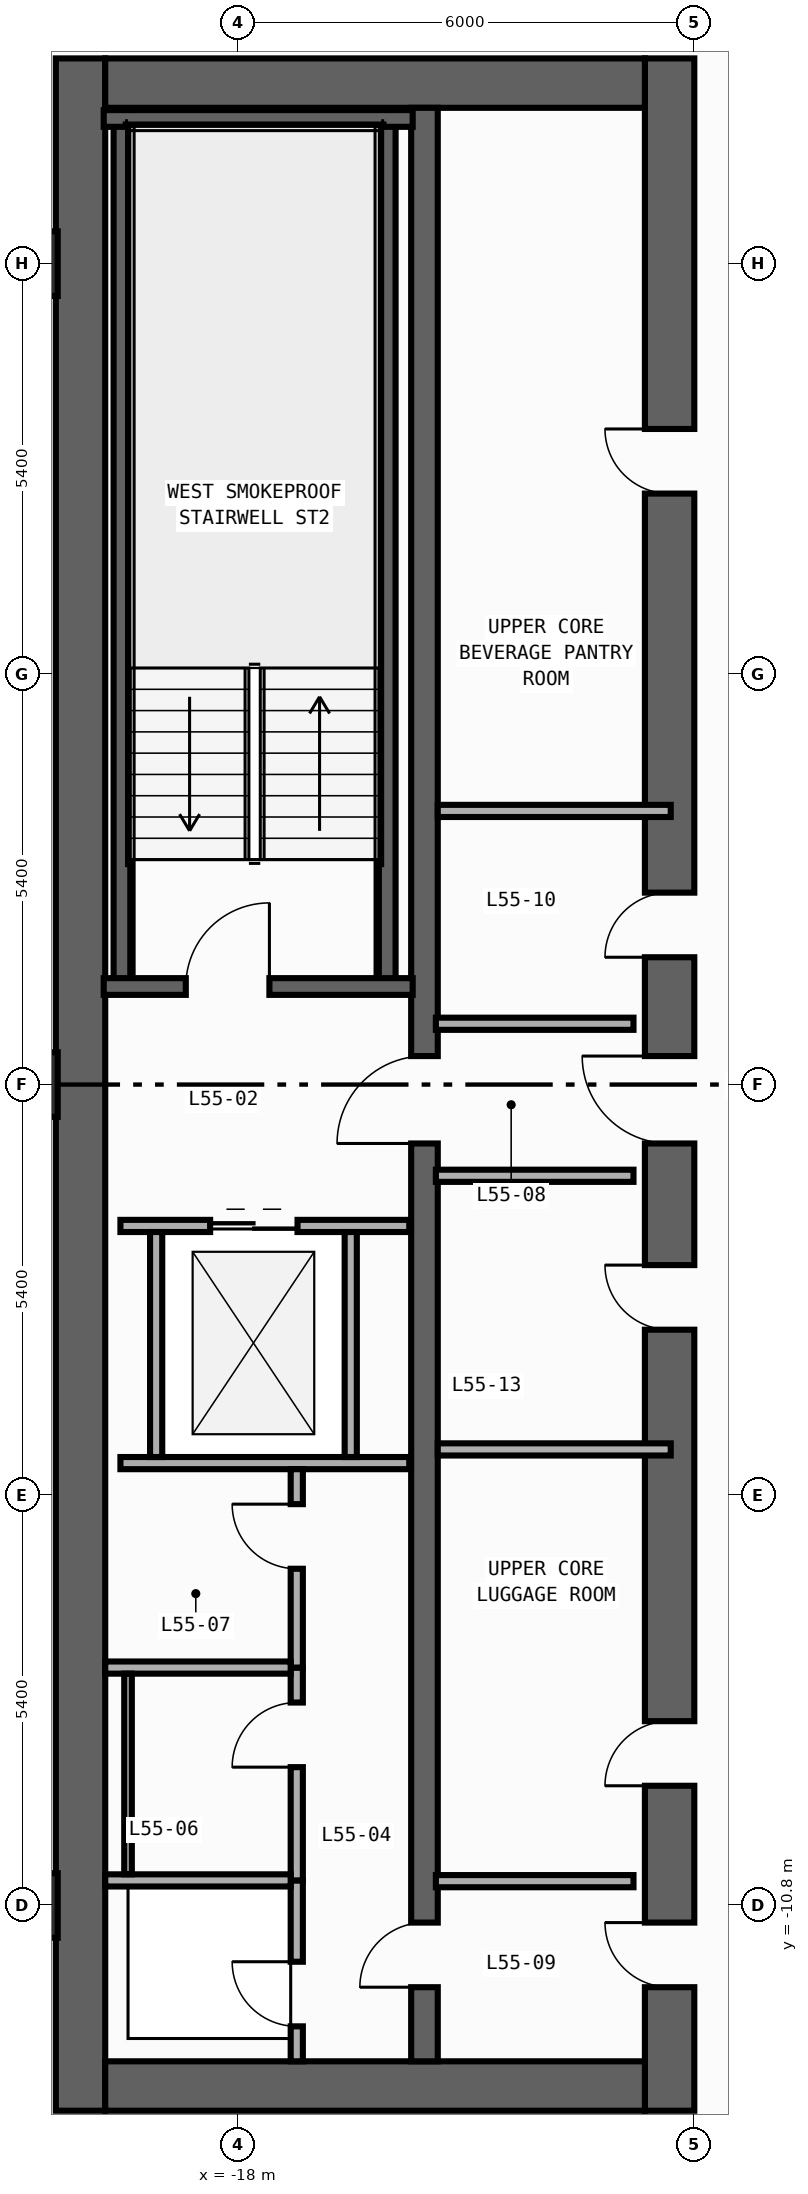
"""IFC4 building model, lengths in metres.
Left out: names, types, materials, properties, quantities, classifications, styles, units other than length and angle.
Written with IfcOpenShell. Run it as: python <this file> out.ifc"""

import sys

from ifc_helpers import new_model, si_unit, direction, frame, frame_2d, origin, origin_2d, place, context, subcontext, project, spatial, rectangle, extrude, element, fill, save


model = new_model("IFC4")
c1 = context("Model", 3, precision=1e-05, world=origin(), true_north=direction((0.0, 1.0)))
c2 = subcontext(c1, "Body", "Model", "MODEL_VIEW")
j1 = project(units=[si_unit("LENGTHUNIT", "METRE"), si_unit("PLANEANGLEUNIT", "RADIAN")], contexts=[c1])
p1 = place(None, origin())
s1 = spatial("IfcSite", under=j1, at=p1, CompositionType="ELEMENT")
p2 = place(p1, origin())
s2 = spatial("IfcBuilding", under=s1, at=p2, CompositionType="ELEMENT")
p3 = place(p2, frame((0.0, 0.0, 236.8)))
s3 = spatial("IfcBuildingStorey", under=s2, at=p3, CompositionType="ELEMENT", Elevation=236.8)
p4 = place(p3, frame((-20.075, -13.5, 0.0), z_axis=(0.0, 0.0, 1.0), x_axis=(0.0, 1.0, 0.0)))
e1 = element("IfcWall", 1, at=p4, inside=s3, PredefinedType="SHEAR", context=c2, shape_type="SweptSolid", body=[
    extrude(rectangle(XDim=27.0, YDim=0.65, at=frame_2d((13.5, 0.0))), origin(), (0.0, 0.0, 1.0), 3.34),
])
p5 = place(p3, frame((-12.325, -13.5, 0.0), z_axis=(0.0, 0.0, 1.0), x_axis=(0.0, 1.0, 0.0)))
e2 = element("IfcWall", 2, at=p5, inside=s3, PredefinedType="SHEAR", context=c2, shape_type="SweptSolid", body=[
    extrude(rectangle(XDim=27.0, YDim=0.65, at=frame_2d((13.5, 0.0))), origin(), (0.0, 0.0, 1.0), 3.34),
])
p6 = place(p5, frame((15.175, 0.0, 0.0)))
e3 = element("IfcOpeningElement", 3, at=p6, cuts=e2, PredefinedType="OPENING", context=c2, shape_type="SweptSolid", body=[
    extrude(rectangle(XDim=0.85, YDim=2.1, at=frame_2d((0.425, 1.05))), frame((0.0, 0.335, 0.0), z_axis=(0.0, -1.0, 0.0), x_axis=(1.0, 0.0, 0.0)), (0.0, 0.0, 1.0), 0.67),
])
p7 = place(p5, frame((21.275, 0.0, 0.0)))
e4 = element("IfcOpeningElement", 4, at=p7, cuts=e2, PredefinedType="OPENING", context=c2, shape_type="SweptSolid", body=[
    extrude(rectangle(XDim=0.85, YDim=2.1, at=frame_2d((0.425, 1.05))), frame((0.0, 0.335, 0.0), z_axis=(0.0, -1.0, 0.0), x_axis=(1.0, 0.0, 0.0)), (0.0, 0.0, 1.0), 0.67),
])
p8 = place(p5, frame((4.275, 0.0, 0.0)))
e5 = element("IfcOpeningElement", 5, at=p8, cuts=e2, PredefinedType="OPENING", context=c2, shape_type="SweptSolid", body=[
    extrude(rectangle(XDim=0.85, YDim=2.1, at=frame_2d((0.425, 1.05))), frame((0.0, 0.335, 0.0), z_axis=(0.0, -1.0, 0.0), x_axis=(1.0, 0.0, 0.0)), (0.0, 0.0, 1.0), 0.67),
])
p9 = place(p5, frame((10.275, 0.0, 0.0)))
e6 = element("IfcOpeningElement", 6, at=p9, cuts=e2, PredefinedType="OPENING", context=c2, shape_type="SweptSolid", body=[
    extrude(rectangle(XDim=0.85, YDim=2.1, at=frame_2d((0.425, 1.05))), frame((0.0, 0.335, 0.0), z_axis=(0.0, -1.0, 0.0), x_axis=(1.0, 0.0, 0.0)), (0.0, 0.0, 1.0), 0.67),
])
p10 = place(p5, frame((12.725, 0.0, 0.0)))
e7 = element("IfcOpeningElement", 7, at=p10, cuts=e2, PredefinedType="OPENING", context=c2, shape_type="SweptSolid", body=[
    extrude(rectangle(XDim=1.15, YDim=2.2, at=frame_2d((0.575, 1.1))), frame((0.0, 0.335, 0.0), z_axis=(0.0, -1.0, 0.0), x_axis=(1.0, 0.0, 0.0)), (0.0, 0.0, 1.0), 0.67),
])
p11 = place(p5, frame((1.625, 0.0, 0.0)))
e8 = element("IfcOpeningElement", 8, at=p11, cuts=e2, PredefinedType="OPENING", context=c2, shape_type="SweptSolid", body=[
    extrude(rectangle(XDim=0.85, YDim=2.1, at=frame_2d((0.425, 1.05))), frame((0.0, 0.335, 0.0), z_axis=(0.0, -1.0, 0.0), x_axis=(1.0, 0.0, 0.0)), (0.0, 0.0, 1.0), 0.67),
])
for number, where, z_axis, x_axis in (
    (9, (-19.75, -13.175, 0.0), (0.0, 0.0, 1.0), (1.0, 0.0, 0.0)),
    (10, (-19.75, 13.175, 0.0), (0.0, 0.0, 1.0), (1.0, 0.0, 0.0)),
):
    element("IfcWall", number, at=place(p3, frame(where, z_axis=z_axis, x_axis=x_axis)), inside=s3, PredefinedType="SHEAR", context=c2, shape_type="SweptSolid", body=[
        extrude(rectangle(XDim=7.1, YDim=0.65, at=frame_2d((3.55, 0.0))), origin(), (0.0, 0.0, 1.0), 3.34),
    ])
p12 = place(p3, frame((-15.55, -12.85, 0.0), z_axis=(0.0, 0.0, 1.0), x_axis=(0.0, 1.0, 0.0)))
e11 = element("IfcWall", 11, at=p12, inside=s3, PredefinedType="SHEAR", context=c2, shape_type="SweptSolid", body=[
    extrude(rectangle(XDim=25.7, YDim=0.35, at=frame_2d((12.85, 0.0))), origin(), (0.0, 0.0, 1.0), 3.34),
])
p13 = place(p12, frame((12.075, 0.0, 0.0)))
e12 = element("IfcOpeningElement", 12, at=p13, cuts=e11, PredefinedType="OPENING", context=c2, shape_type="SweptSolid", body=[
    extrude(rectangle(XDim=1.15, YDim=2.2, at=frame_2d((0.575, 1.1))), frame((0.0, 0.185, 0.0), z_axis=(0.0, -1.0, 0.0), x_axis=(1.0, 0.0, 0.0)), (0.0, 0.0, 1.0), 0.37),
])
p14 = place(p12, frame((0.975, 0.0, 0.0)))
e13 = element("IfcOpeningElement", 13, at=p14, cuts=e11, PredefinedType="OPENING", context=c2, shape_type="SweptSolid", body=[
    extrude(rectangle(XDim=0.85, YDim=2.1, at=frame_2d((0.425, 1.05))), frame((0.0, 0.185, 0.0), z_axis=(0.0, -1.0, 0.0), x_axis=(1.0, 0.0, 0.0)), (0.0, 0.0, 1.0), 0.37),
])
for number, where, z_axis, x_axis in (
    (14, (-16.04, 1.29, 0.0), (0.0, 0.0, 1.0), (0.0, 1.0, 0.0)),
    (15, (-19.53, 1.29, 0.0), (0.0, 0.0, 1.0), (0.0, 1.0, 0.0)),
):
    element("IfcWall", number, at=place(p3, frame(where, z_axis=z_axis, x_axis=x_axis)), inside=s3, PredefinedType="SHEAR", context=c2, shape_type="SweptSolid", body=[
        extrude(rectangle(XDim=11.42, YDim=0.22, at=frame_2d((5.71, 0.0))), origin(), (0.0, 0.0, 1.0), 3.34),
    ])
p15 = place(p3, frame((-19.77, 12.71, 0.0), z_axis=(0.0, 0.0, 1.0), x_axis=(1.0, 0.0, 0.0)))
e16 = element("IfcWall", 16, at=p15, inside=s3, PredefinedType="SHEAR", context=c2, shape_type="SweptSolid", body=[
    extrude(rectangle(XDim=4.065, YDim=0.22, at=frame_2d((2.032, 0.0))), origin(), (0.0, 0.0, 1.0), 3.34),
])
p16 = place(p3, frame((-19.77, 1.29, 0.0), z_axis=(0.0, 0.0, 1.0), x_axis=(1.0, 0.0, 0.0)))
e17 = element("IfcWall", 17, at=p16, inside=s3, PredefinedType="SHEAR", context=c2, shape_type="SweptSolid", body=[
    extrude(rectangle(XDim=4.065, YDim=0.22, at=frame_2d((2.032, 0.0))), origin(), (0.0, 0.0, 1.0), 3.34),
])
p17 = place(p16, frame((1.08, 0.0, 0.0)))
e18 = element("IfcOpeningElement", 18, at=p17, cuts=e17, PredefinedType="OPENING", context=c2, shape_type="SweptSolid", body=[
    extrude(rectangle(XDim=1.1, YDim=2.2, at=frame_2d((0.55, 1.1))), frame((0.0, 0.12, 0.0), z_axis=(0.0, -1.0, 0.0), x_axis=(1.0, 0.0, 0.0)), (0.0, 0.0, 1.0), 0.24),
])
for number, where, z_axis, x_axis in (
    (19, (-20.8, -10.8, 0.0), (0.0, 0.0, 1.0), (1.0, 0.0, 0.0)),
    (20, (-20.8, 0.0, 0.0), (0.0, 0.0, 1.0), (1.0, 0.0, 0.0)),
    (21, (-20.8, 10.8, 0.0), (0.0, 0.0, 1.0), (1.0, 0.0, 0.0)),
):
    element("IfcColumn", number, at=place(p3, frame(where, z_axis=z_axis, x_axis=x_axis)), inside=s3, PredefinedType="COLUMN", context=c2, shape_type="SweptSolid", body=[
        extrude(rectangle(XDim=0.85, YDim=0.85, at=origin_2d()), origin(), (0.0, 0.0, 1.0), 3.6),
    ])
p18 = place(p3, frame((-19.55, -1.86, 0.0), z_axis=(0.0, 0.0, 1.0), x_axis=(1.0, 0.0, 0.0)))
e22 = element("IfcWall", 22, at=p18, inside=s3, PredefinedType="STANDARD", context=c2, shape_type="SweptSolid", body=[
    extrude(rectangle(XDim=3.8, YDim=0.16, at=frame_2d((1.9, 0.0))), origin(), (0.0, 0.0, 1.0), 3.34),
])
p19 = place(p18, frame((1.18, 0.0, 0.0)))
e23 = element("IfcOpeningElement", 23, at=p19, cuts=e22, PredefinedType="OPENING", context=c2, shape_type="SweptSolid", body=[
    extrude(rectangle(XDim=1.15, YDim=2.2, at=frame_2d((0.575, 1.1))), frame((0.0, 0.09, 0.0), z_axis=(0.0, -1.0, 0.0), x_axis=(1.0, 0.0, 0.0)), (0.0, 0.0, 1.0), 0.18),
])
p20 = place(p3, frame((-19.55, -4.98, 0.0), z_axis=(0.0, 0.0, 1.0), x_axis=(1.0, 0.0, 0.0)))
e24 = element("IfcWall", 24, at=p20, inside=s3, PredefinedType="STANDARD", context=c2, shape_type="SweptSolid", body=[
    extrude(rectangle(XDim=3.8, YDim=0.16, at=frame_2d((1.9, 0.0))), origin(), (0.0, 0.0, 1.0), 3.34),
])
for number, where, z_axis, x_axis in (
    (25, (-19.08, -4.9, 0.0), (0.0, 0.0, 1.0), (0.0, 1.0, 0.0)),
    (26, (-16.52, -4.9, 0.0), (0.0, 0.0, 1.0), (0.0, 1.0, 0.0)),
):
    element("IfcWall", number, at=place(p3, frame(where, z_axis=z_axis, x_axis=x_axis)), inside=s3, PredefinedType="STANDARD", context=c2, shape_type="SweptSolid", body=[
        extrude(rectangle(XDim=2.96, YDim=0.16, at=frame_2d((1.48, 0.0))), origin(), (0.0, 0.0, 1.0), 3.34),
    ])
for number, where, z_axis, x_axis in (
    (27, (-15.4, 0.8, 0.0), (0.0, 0.0, 1.0), (1.0, 0.0, 0.0)),
    (28, (-15.4, -1.2, 0.0), (0.0, 0.0, 1.0), (1.0, 0.0, 0.0)),
    (29, (-15.4, -10.48, 0.0), (0.0, 0.0, 1.0), (1.0, 0.0, 0.0)),
):
    element("IfcWall", number, at=place(p3, frame(where, z_axis=z_axis, x_axis=x_axis)), inside=s3, PredefinedType="STANDARD", context=c2, shape_type="SweptSolid", body=[
        extrude(rectangle(XDim=2.6, YDim=0.16, at=frame_2d((1.3, 0.0))), origin(), (0.0, 0.0, 1.0), 3.34),
    ])
p21 = place(p3, frame((-17.23, -12.85, 0.0), z_axis=(0.0, 0.0, 1.0), x_axis=(0.0, 1.0, 0.0)))
e30 = element("IfcWall", 30, at=p21, inside=s3, PredefinedType="PARTITIONING", context=c2, shape_type="SweptSolid", body=[
    extrude(rectangle(XDim=2.38, YDim=0.16, at=frame_2d((1.19, 0.0))), origin(), (0.0, 0.0, 1.0), 3.34),
])
p22 = place(p21, frame((0.46, 0.0, 0.0)))
e31 = element("IfcOpeningElement", 31, at=p22, cuts=e30, PredefinedType="OPENING", context=c2, shape_type="SweptSolid", body=[
    extrude(rectangle(XDim=0.85, YDim=2.1, at=frame_2d((0.425, 1.05))), frame((0.0, 0.09, 0.0), z_axis=(0.0, -1.0, 0.0), x_axis=(1.0, 0.0, 0.0)), (0.0, 0.0, 1.0), 0.18),
])
p23 = place(p3, frame((-17.23, -10.47, 0.0), z_axis=(0.0, 0.0, 1.0), x_axis=(0.0, 1.0, 0.0)))
e32 = element("IfcWall", 32, at=p23, inside=s3, PredefinedType="PARTITIONING", context=c2, shape_type="SweptSolid", body=[
    extrude(rectangle(XDim=2.8, YDim=0.16, at=frame_2d((1.4, 0.0))), origin(), (0.0, 0.0, 1.0), 3.34),
])
p24 = place(p23, frame((1.49, 0.0, 0.0)))
e33 = element("IfcOpeningElement", 33, at=p24, cuts=e32, PredefinedType="OPENING", context=c2, shape_type="SweptSolid", body=[
    extrude(rectangle(XDim=0.85, YDim=2.1, at=frame_2d((0.425, 1.05))), frame((0.0, 0.09, 0.0), z_axis=(0.0, -1.0, 0.0), x_axis=(1.0, 0.0, 0.0)), (0.0, 0.0, 1.0), 0.18),
])
p25 = place(p3, frame((-17.23, -7.67, 0.0), z_axis=(0.0, 0.0, 1.0), x_axis=(0.0, 1.0, 0.0)))
e34 = element("IfcWall", 34, at=p25, inside=s3, PredefinedType="PARTITIONING", context=c2, shape_type="SweptSolid", body=[
    extrude(rectangle(XDim=2.61, YDim=0.16, at=frame_2d((1.305, 0.0))), origin(), (0.0, 0.0, 1.0), 3.34),
])
p26 = place(p25, frame((1.3, 0.0, 0.0)))
e35 = element("IfcOpeningElement", 35, at=p26, cuts=e34, PredefinedType="OPENING", context=c2, shape_type="SweptSolid", body=[
    extrude(rectangle(XDim=0.85, YDim=2.1, at=frame_2d((0.425, 1.05))), frame((0.0, 0.09, 0.0), z_axis=(0.0, -1.0, 0.0), x_axis=(1.0, 0.0, 0.0)), (0.0, 0.0, 1.0), 0.18),
])
for number, where, z_axis, x_axis in (
    (36, (-19.75, -10.47, 0.0), (0.0, 0.0, 1.0), (1.0, 0.0, 0.0)),
    (37, (-19.75, -7.67, 0.0), (0.0, 0.0, 1.0), (1.0, 0.0, 0.0)),
):
    element("IfcWall", number, at=place(p3, frame(where, z_axis=z_axis, x_axis=x_axis)), inside=s3, PredefinedType="PARTITIONING", context=c2, shape_type="SweptSolid", body=[
        extrude(rectangle(XDim=2.44, YDim=0.16, at=frame_2d((1.22, 0.0))), origin(), (0.0, 0.0, 1.0), 3.34),
    ])
for number, where, z_axis, x_axis in (
    (38, (-15.375, 3.6, 0.0), (0.0, 0.0, 1.0), (1.0, 0.0, 0.0)),
    (39, (-15.375, -4.8, 0.0), (0.0, 0.0, 1.0), (1.0, 0.0, 0.0)),
):
    element("IfcWall", number, at=place(p3, frame(where, z_axis=z_axis, x_axis=x_axis)), inside=s3, PredefinedType="PARTITIONING", context=c2, shape_type="SweptSolid", body=[
        extrude(rectangle(XDim=3.065, YDim=0.16, at=frame_2d((1.532, 0.0))), origin(), (0.0, 0.0, 1.0), 3.34),
    ])
p27 = place(p3, frame((-19.45, -10.39, 0.0), z_axis=(0.0, 0.0, 1.0), x_axis=(0.0, 1.0, 0.0)))
e40 = element("IfcWall", 40, at=p27, inside=s3, PredefinedType="PARTITIONING", context=c2, shape_type="SweptSolid", body=[
    extrude(rectangle(XDim=2.64, YDim=0.1, at=frame_2d((1.32, 0.0))), origin(), (0.0, 0.0, 1.0), 3.34),
])
p28 = place(p17, origin())
e41 = element("IfcDoor", 41, at=p28, inside=s3, OperationType="SINGLE_SWING_RIGHT", PredefinedType="DOOR", context=c2, shape_type="SweptSolid", body=[
    extrude(rectangle(XDim=1.1, YDim=2.2, at=frame_2d((0.55, 1.1))), frame((0.0, 0.025, 0.0), z_axis=(0.0, -1.0, 0.0), x_axis=(1.0, 0.0, 0.0)), (0.0, 0.0, 1.0), 0.05),
])
fill(e18, e41)
p29 = place(p6, origin())
e42 = element("IfcDoor", 42, at=p29, inside=s3, OperationType="SINGLE_SWING_LEFT", PredefinedType="DOOR", context=c2, shape_type="SweptSolid", body=[
    extrude(rectangle(XDim=0.85, YDim=2.1, at=frame_2d((0.425, 1.05))), frame((0.0, 0.025, 0.0), z_axis=(0.0, -1.0, 0.0), x_axis=(1.0, 0.0, 0.0)), (0.0, 0.0, 1.0), 0.05),
])
fill(e3, e42)
p30 = place(p7, origin())
e43 = element("IfcDoor", 43, at=p30, inside=s3, OperationType="SINGLE_SWING_RIGHT", PredefinedType="DOOR", context=c2, shape_type="SweptSolid", body=[
    extrude(rectangle(XDim=0.85, YDim=2.1, at=frame_2d((0.425, 1.05))), frame((0.0, 0.025, 0.0), z_axis=(0.0, -1.0, 0.0), x_axis=(1.0, 0.0, 0.0)), (0.0, 0.0, 1.0), 0.05),
])
fill(e4, e43)
p31 = place(p8, origin())
e44 = element("IfcDoor", 44, at=p31, inside=s3, OperationType="SINGLE_SWING_LEFT", PredefinedType="DOOR", context=c2, shape_type="SweptSolid", body=[
    extrude(rectangle(XDim=0.85, YDim=2.1, at=frame_2d((0.425, 1.05))), frame((0.0, 0.025, 0.0), z_axis=(0.0, -1.0, 0.0), x_axis=(1.0, 0.0, 0.0)), (0.0, 0.0, 1.0), 0.05),
])
fill(e5, e44)
p32 = place(p9, origin())
e45 = element("IfcDoor", 45, at=p32, inside=s3, OperationType="SINGLE_SWING_RIGHT", PredefinedType="DOOR", context=c2, shape_type="SweptSolid", body=[
    extrude(rectangle(XDim=0.85, YDim=2.1, at=frame_2d((0.425, 1.05))), frame((0.0, 0.025, 0.0), z_axis=(0.0, -1.0, 0.0), x_axis=(1.0, 0.0, 0.0)), (0.0, 0.0, 1.0), 0.05),
])
fill(e6, e45)
p33 = place(p10, origin())
e46 = element("IfcDoor", 46, at=p33, inside=s3, OperationType="SINGLE_SWING_RIGHT", PredefinedType="DOOR", context=c2, shape_type="SweptSolid", body=[
    extrude(rectangle(XDim=1.15, YDim=2.2, at=frame_2d((0.575, 1.1))), frame((0.0, 0.025, 0.0), z_axis=(0.0, -1.0, 0.0), x_axis=(1.0, 0.0, 0.0)), (0.0, 0.0, 1.0), 0.05),
])
fill(e7, e46)
p34 = place(p13, origin())
e47 = element("IfcDoor", 47, at=p34, inside=s3, OperationType="SINGLE_SWING_LEFT", PredefinedType="DOOR", context=c2, shape_type="SweptSolid", body=[
    extrude(rectangle(XDim=1.15, YDim=2.2, at=frame_2d((0.575, 1.1))), frame((0.0, 0.025, 0.0), z_axis=(0.0, -1.0, 0.0), x_axis=(1.0, 0.0, 0.0)), (0.0, 0.0, 1.0), 0.05),
])
fill(e12, e47)
p35 = place(p11, origin())
e48 = element("IfcDoor", 48, at=p35, inside=s3, OperationType="SINGLE_SWING_RIGHT", PredefinedType="DOOR", context=c2, shape_type="SweptSolid", body=[
    extrude(rectangle(XDim=0.85, YDim=2.1, at=frame_2d((0.425, 1.05))), frame((0.0, 0.025, 0.0), z_axis=(0.0, -1.0, 0.0), x_axis=(1.0, 0.0, 0.0)), (0.0, 0.0, 1.0), 0.05),
])
fill(e8, e48)
p36 = place(p14, origin())
e49 = element("IfcDoor", 49, at=p36, inside=s3, OperationType="SINGLE_SWING_LEFT", PredefinedType="DOOR", context=c2, shape_type="SweptSolid", body=[
    extrude(rectangle(XDim=0.85, YDim=2.1, at=frame_2d((0.425, 1.05))), frame((0.0, 0.025, 0.0), z_axis=(0.0, -1.0, 0.0), x_axis=(1.0, 0.0, 0.0)), (0.0, 0.0, 1.0), 0.05),
])
fill(e13, e49)
p37 = place(p19, origin())
e50 = element("IfcDoor", 50, at=p37, inside=s3, OperationType="DOUBLE_DOOR_SLIDING", PredefinedType="DOOR", context=c2, shape_type="SweptSolid", body=[
    extrude(rectangle(XDim=1.15, YDim=2.2, at=frame_2d((0.575, 1.1))), frame((0.0, 0.025, 0.0), z_axis=(0.0, -1.0, 0.0), x_axis=(1.0, 0.0, 0.0)), (0.0, 0.0, 1.0), 0.05),
])
fill(e23, e50)
p38 = place(p22, origin())
e51 = element("IfcDoor", 51, at=p38, inside=s3, OperationType="SINGLE_SWING_RIGHT", PredefinedType="DOOR", context=c2, shape_type="SweptSolid", body=[
    extrude(rectangle(XDim=0.85, YDim=2.1, at=frame_2d((0.425, 1.05))), frame((0.0, 0.025, 0.0), z_axis=(0.0, -1.0, 0.0), x_axis=(1.0, 0.0, 0.0)), (0.0, 0.0, 1.0), 0.05),
])
fill(e31, e51)
p39 = place(p24, origin())
e52 = element("IfcDoor", 52, at=p39, inside=s3, OperationType="SINGLE_SWING_LEFT", PredefinedType="DOOR", context=c2, shape_type="SweptSolid", body=[
    extrude(rectangle(XDim=0.85, YDim=2.1, at=frame_2d((0.425, 1.05))), frame((0.0, 0.025, 0.0), z_axis=(0.0, -1.0, 0.0), x_axis=(1.0, 0.0, 0.0)), (0.0, 0.0, 1.0), 0.05),
])
fill(e33, e52)
p40 = place(p26, origin())
e53 = element("IfcDoor", 53, at=p40, inside=s3, OperationType="SINGLE_SWING_RIGHT", PredefinedType="DOOR", context=c2, shape_type="SweptSolid", body=[
    extrude(rectangle(XDim=0.85, YDim=2.1, at=frame_2d((0.425, 1.05))), frame((0.0, 0.025, 0.0), z_axis=(0.0, -1.0, 0.0), x_axis=(1.0, 0.0, 0.0)), (0.0, 0.0, 1.0), 0.05),
])
fill(e35, e53)
save(model, sys.argv[1])
